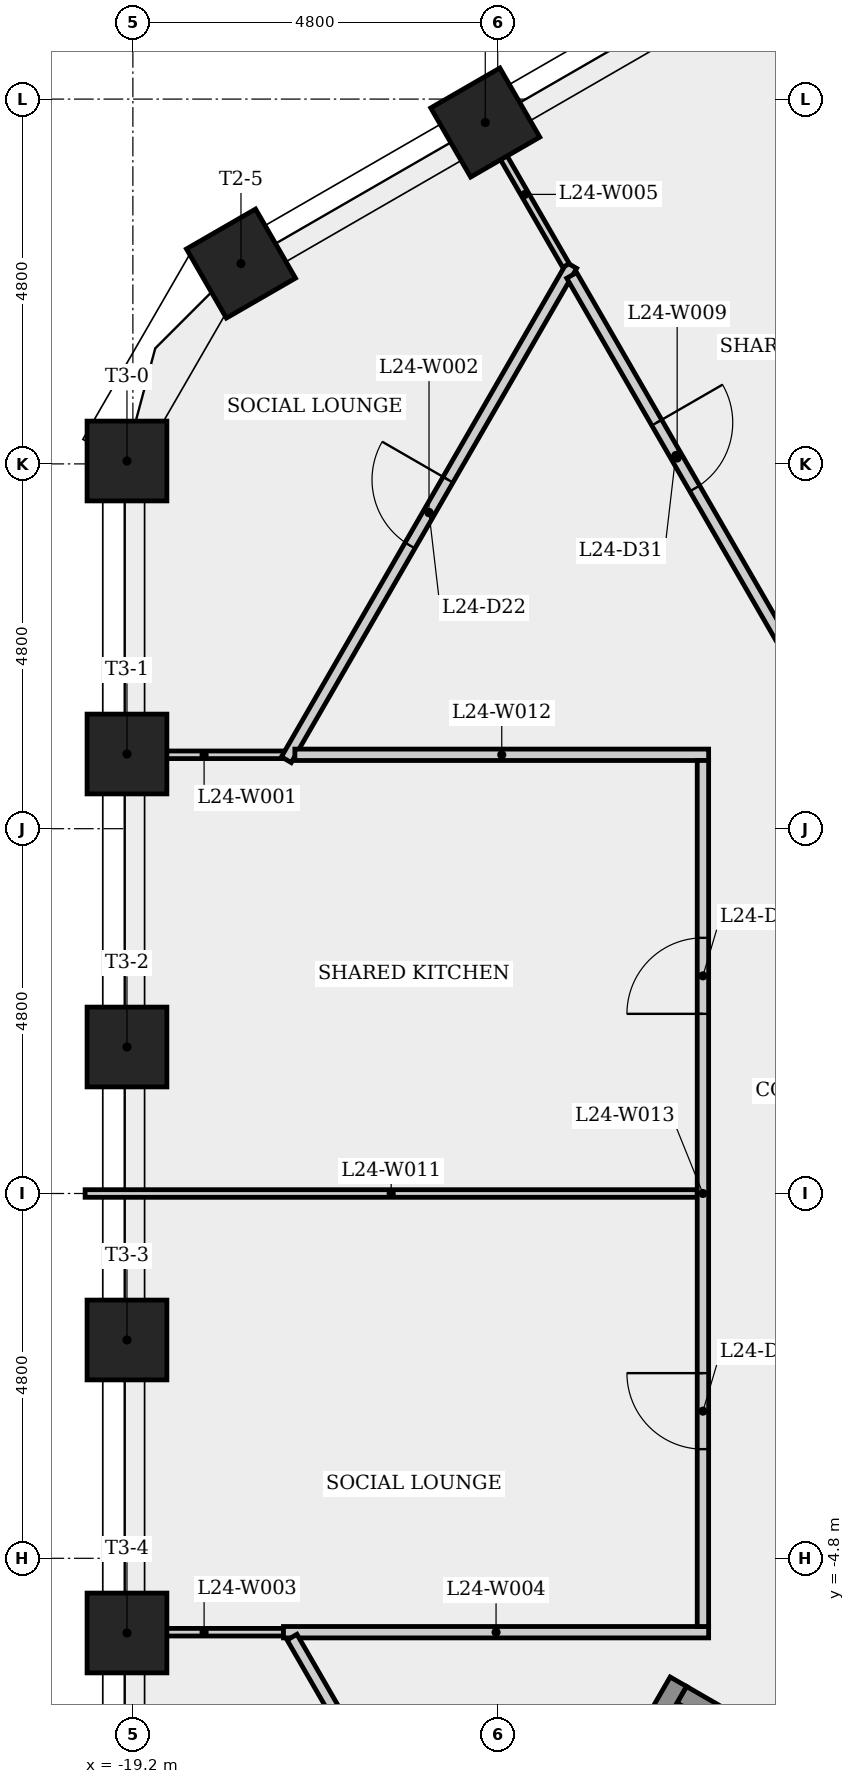
"""IFC4 building model, lengths in metres.
Left out: names, types, materials, properties, quantities, classifications, styles, units other than length and angle.
Written with IfcOpenShell. Run it as: python <this file> out.ifc"""

import sys

from ifc_helpers import new_model, si_unit, direction, frame, frame_2d, origin, origin_2d, place, context, subcontext, project, spatial, rectangle, extrude, element, fill, save


model = new_model("IFC4")
c1 = context("Model", 3, precision=1e-05, world=origin(), true_north=direction((0.0, 1.0)))
c2 = subcontext(c1, "Body", "Model", "MODEL_VIEW")
j1 = project(units=[si_unit("LENGTHUNIT", "METRE"), si_unit("PLANEANGLEUNIT", "RADIAN")], contexts=[c1])
p1 = place(None, origin())
s1 = spatial("IfcSite", under=j1, at=p1, CompositionType="ELEMENT")
p2 = place(p1, origin())
s2 = spatial("IfcBuilding", under=s1, at=p2, CompositionType="ELEMENT")
p3 = place(p2, frame((0.0, 0.0, 93.3)))
s3 = spatial("IfcBuildingStorey", under=s2, at=p3, CompositionType="ELEMENT", Elevation=93.3)
for number, where, z_axis, x_axis in (
    (1, (-14.564, 14.092, 0.0), (0.0, 0.0, 1.0), (-0.5, 0.866, 0.0)),
    (2, (-17.778, 12.236, 0.0), (0.0, 0.0, 1.0), (-0.5, 0.866, 0.0)),
    (3, (-19.278, 9.638, 0.0), (0.0, 0.0, 1.0), (-1.0, 0.0, 0.0)),
    (4, (-19.278, 5.783, 0.0), (0.0, 0.0, 1.0), (-1.0, 0.0, 0.0)),
    (5, (-19.278, 1.927, 0.0), (0.0, 0.0, 1.0), (-1.0, 0.0, 0.0)),
    (6, (-19.278, -1.927, 0.0), (0.0, 0.0, 1.0), (-1.0, 0.0, 0.0)),
    (7, (-19.278, -5.783, 0.0), (0.0, 0.0, 1.0), (-1.0, 0.0, 0.0)),
):
    element("IfcColumn", number, at=place(p3, frame(where, z_axis=z_axis, x_axis=x_axis)), inside=s3, PredefinedType="COLUMN", context=c2, shape_type="SweptSolid", body=[
        extrude(rectangle(XDim=1.05, YDim=1.05, at=origin_2d()), origin(), (0.0, 0.0, 1.0), 3.4),
    ])
p4 = place(p3, frame((-17.219, 5.772, 0.0), z_axis=(0.0, 0.0, 1.0), x_axis=(-1.0, 0.0, 0.0)))
e8 = element("IfcWall", 8, at=p4, inside=s3, PredefinedType="PARTITIONING", context=c2, shape_type="SweptSolid", body=[
    extrude(rectangle(XDim=2.089, YDim=0.1, at=frame_2d((1.044, 0.0))), origin(), (0.0, 0.0, 1.0), 3.05),
])
p5 = place(p3, frame((-17.181, 5.708, 0.0), z_axis=(0.0, 0.0, 1.0), x_axis=(0.50000294753, 0.86602370202, 0.0)))
e9 = element("IfcWall", 9, at=p5, inside=s3, PredefinedType="PARTITIONING", context=c2, shape_type="SweptSolid", body=[
    extrude(rectangle(XDim=7.509, YDim=0.15, at=frame_2d((3.755, 0.0))), origin(), (0.0, 0.0, 1.0), 3.05),
])
p6 = place(p5, frame((3.255, 0.0, 0.0)))
e10 = element("IfcOpeningElement", 10, at=p6, cuts=e9, PredefinedType="OPENING", context=c2, shape_type="SweptSolid", body=[
    extrude(rectangle(XDim=1.0, YDim=2.1, at=frame_2d((0.5, 1.05))), frame((0.0, 0.085, 0.0), z_axis=(0.0, -1.0, 0.0), x_axis=(1.0, 0.0, 0.0)), (0.0, 0.0, 1.0), 0.17),
])
p7 = place(p3, frame((-17.219, -5.772, 0.0), z_axis=(0.0, 0.0, 1.0), x_axis=(-1.0, 0.0, 0.0)))
e11 = element("IfcWall", 11, at=p7, inside=s3, PredefinedType="PARTITIONING", context=c2, shape_type="SweptSolid", body=[
    extrude(rectangle(XDim=2.089, YDim=0.1, at=frame_2d((1.044, 0.0))), origin(), (0.0, 0.0, 1.0), 3.05),
])
p8 = place(p3, frame((-17.219, -5.772, 0.0), z_axis=(0.0, 0.0, 1.0), x_axis=(1.0, 0.0, 0.0)))
e12 = element("IfcWall", 12, at=p8, inside=s3, PredefinedType="PARTITIONING", context=c2, shape_type="SweptSolid", body=[
    extrude(rectangle(XDim=5.594, YDim=0.15, at=frame_2d((2.797, 0.0))), origin(), (0.0, 0.0, 1.0), 3.05),
])
p9 = place(p3, frame((-14.582, 14.081, 0.0), z_axis=(0.0, 0.0, 1.0), x_axis=(0.49994423739, -0.866057595949, 0.0)))
e13 = element("IfcWall", 13, at=p9, inside=s3, PredefinedType="PARTITIONING", context=c2, shape_type="SweptSolid", body=[
    extrude(rectangle(XDim=2.16, YDim=0.1, at=frame_2d((1.08, 0.0))), origin(), (0.0, 0.0, 1.0), 3.05),
])
p10 = place(p3, frame((-14.358, -10.598, 0.0), z_axis=(0.0, 0.0, 1.0), x_axis=(-0.499988999718, 0.866031754707, 0.0)))
e14 = element("IfcWall", 14, at=p10, inside=s3, PredefinedType="PARTITIONING", context=c2, shape_type="SweptSolid", body=[
    extrude(rectangle(XDim=5.497, YDim=0.15, at=frame_2d((2.749, 0.0))), origin(), (0.0, 0.0, 1.0), 3.05),
])
p11 = place(p10, frame((2.286, 0.0, 0.0)))
e15 = element("IfcOpeningElement", 15, at=p11, cuts=e14, PredefinedType="OPENING", context=c2, shape_type="SweptSolid", body=[
    extrude(rectangle(XDim=1.0, YDim=2.1, at=frame_2d((0.5, 1.05))), frame((0.0, 0.085, 0.0), z_axis=(0.0, -1.0, 0.0), x_axis=(1.0, 0.0, 0.0)), (0.0, 0.0, 1.0), 0.17),
])
p12 = place(p3, frame((-13.648, -9.239, 0.0), z_axis=(0.0, 0.0, 1.0), x_axis=(0.500017246033, 0.866015446554, 0.0)))
e16 = element("IfcWall", 16, at=p12, inside=s3, PredefinedType="SHEAR", context=c2, shape_type="SweptSolid", body=[
    extrude(rectangle(XDim=3.25, YDim=0.25, at=frame_2d((1.625, 0.0))), origin(), (0.0, 0.0, 1.0), 3.05),
])
p13 = place(p3, frame((-13.427, 12.081, 0.0), z_axis=(0.0, 0.0, 1.0), x_axis=(0.499966127528, -0.866044959182, 0.0)))
e17 = element("IfcWall", 17, at=p13, inside=s3, PredefinedType="PARTITIONING", context=c2, shape_type="SweptSolid", body=[
    extrude(rectangle(XDim=5.551, YDim=0.15, at=frame_2d((2.775, 0.0))), origin(), (0.0, 0.0, 1.0), 3.05),
])
p14 = place(p13, frame((2.238, 0.0, 0.0)))
e18 = element("IfcOpeningElement", 18, at=p14, cuts=e17, PredefinedType="OPENING", context=c2, shape_type="SweptSolid", body=[
    extrude(rectangle(XDim=1.0, YDim=2.1, at=frame_2d((0.5, 1.05))), frame((0.0, 0.085, 0.0), z_axis=(0.0, -1.0, 0.0), x_axis=(1.0, 0.0, 0.0)), (0.0, 0.0, 1.0), 0.17),
])
p15 = place(p3, frame((-11.977, -6.595, 0.0), z_axis=(0.0, 0.0, 1.0), x_axis=(0.866025499775, -0.499999833739, 0.0)))
e19 = element("IfcWall", 19, at=p15, inside=s3, PredefinedType="SHEAR", context=c2, shape_type="SweptSolid", body=[
    extrude(rectangle(XDim=6.4, YDim=0.25, at=frame_2d((3.2, 0.0))), origin(), (0.0, 0.0, 1.0), 3.05),
])
p16 = place(p15, frame((5.025, 0.0, 0.0)))
e20 = element("IfcOpeningElement", 20, at=p16, cuts=e19, PredefinedType="OPENING", context=c2, shape_type="SweptSolid", body=[
    extrude(rectangle(XDim=1.0, YDim=2.1, at=frame_2d((0.5, 1.05))), frame((0.0, 0.135, 0.0), z_axis=(0.0, -1.0, 0.0), x_axis=(1.0, 0.0, 0.0)), (0.0, 0.0, 1.0), 0.27),
])
p17 = place(p3, frame((-11.775, 0.0, 0.0), z_axis=(0.0, 0.0, 1.0), x_axis=(-1.0, 0.0, 0.0)))
e21 = element("IfcWall", 21, at=p17, inside=s3, PredefinedType="PARTITIONING", context=c2, shape_type="SweptSolid", body=[
    extrude(rectangle(XDim=8.054, YDim=0.1, at=frame_2d((4.027, 0.0))), origin(), (0.0, 0.0, 1.0), 3.05),
])
p18 = place(p3, frame((-11.625, 5.772, 0.0), z_axis=(0.0, 0.0, 1.0), x_axis=(-1.0, 0.0, 0.0)))
e22 = element("IfcWall", 22, at=p18, inside=s3, PredefinedType="PARTITIONING", context=c2, shape_type="SweptSolid", body=[
    extrude(rectangle(XDim=5.444, YDim=0.15, at=frame_2d((2.722, 0.0))), origin(), (0.0, 0.0, 1.0), 3.05),
])
p19 = place(p3, frame((-11.7, -5.698, 0.0), z_axis=(0.0, 0.0, 1.0), x_axis=(0.0, 1.0, 0.0)))
e23 = element("IfcWall", 23, at=p19, inside=s3, PredefinedType="PARTITIONING", context=c2, shape_type="SweptSolid", body=[
    extrude(rectangle(XDim=11.395, YDim=0.15, at=frame_2d((5.698, 0.0))), origin(), (0.0, 0.0, 1.0), 3.05),
])
p20 = place(p19, frame((8.061, 0.0, 0.0)))
e24 = element("IfcOpeningElement", 24, at=p20, cuts=e23, PredefinedType="OPENING", context=c2, shape_type="SweptSolid", body=[
    extrude(rectangle(XDim=1.0, YDim=2.1, at=frame_2d((0.5, 1.05))), frame((0.0, 0.085, 0.0), z_axis=(0.0, -1.0, 0.0), x_axis=(1.0, 0.0, 0.0)), (0.0, 0.0, 1.0), 0.17),
])
p21 = place(p19, frame((2.334, 0.0, 0.0)))
e25 = element("IfcOpeningElement", 25, at=p21, cuts=e23, PredefinedType="OPENING", context=c2, shape_type="SweptSolid", body=[
    extrude(rectangle(XDim=1.0, YDim=2.1, at=frame_2d((0.5, 1.05))), frame((0.0, 0.085, 0.0), z_axis=(0.0, -1.0, 0.0), x_axis=(1.0, 0.0, 0.0)), (0.0, 0.0, 1.0), 0.17),
])
p22 = place(p3, frame((-6.984, 9.564, 0.0), z_axis=(0.0, 0.0, 1.0), x_axis=(-0.499997453958, 0.866026873738, 0.0)))
e26 = element("IfcWall", 26, at=p22, inside=s3, PredefinedType="PARTITIONING", context=c2, shape_type="SweptSolid", body=[
    extrude(rectangle(XDim=7.71, YDim=0.1, at=frame_2d((3.855, 0.0))), origin(), (0.0, 0.0, 1.0), 3.05),
])
p23 = place(p6, origin())
e27 = element("IfcDoor", 27, at=p23, inside=s3, OperationType="SINGLE_SWING_RIGHT", PredefinedType="DOOR", context=c2, shape_type="SweptSolid", body=[
    extrude(rectangle(XDim=1.0, YDim=2.1, at=frame_2d((0.5, 1.05))), frame((0.0, 0.025, 0.0), z_axis=(0.0, -1.0, 0.0), x_axis=(1.0, 0.0, 0.0)), (0.0, 0.0, 1.0), 0.05),
])
fill(e10, e27)
p24 = place(p20, origin())
e28 = element("IfcDoor", 28, at=p24, inside=s3, OperationType="SINGLE_SWING_LEFT", PredefinedType="DOOR", context=c2, shape_type="SweptSolid", body=[
    extrude(rectangle(XDim=1.0, YDim=2.1, at=frame_2d((0.5, 1.05))), frame((0.0, 0.025, 0.0), z_axis=(0.0, -1.0, 0.0), x_axis=(1.0, 0.0, 0.0)), (0.0, 0.0, 1.0), 0.05),
])
fill(e24, e28)
p25 = place(p21, origin())
e29 = element("IfcDoor", 29, at=p25, inside=s3, OperationType="SINGLE_SWING_RIGHT", PredefinedType="DOOR", context=c2, shape_type="SweptSolid", body=[
    extrude(rectangle(XDim=1.0, YDim=2.1, at=frame_2d((0.5, 1.05))), frame((0.0, 0.025, 0.0), z_axis=(0.0, -1.0, 0.0), x_axis=(1.0, 0.0, 0.0)), (0.0, 0.0, 1.0), 0.05),
])
fill(e25, e29)
p26 = place(p14, origin())
e30 = element("IfcDoor", 30, at=p26, inside=s3, OperationType="SINGLE_SWING_LEFT", PredefinedType="DOOR", context=c2, shape_type="SweptSolid", body=[
    extrude(rectangle(XDim=1.0, YDim=2.1, at=frame_2d((0.5, 1.05))), frame((0.0, 0.025, 0.0), z_axis=(0.0, -1.0, 0.0), x_axis=(1.0, 0.0, 0.0)), (0.0, 0.0, 1.0), 0.05),
])
fill(e18, e30)
save(model, sys.argv[1])
